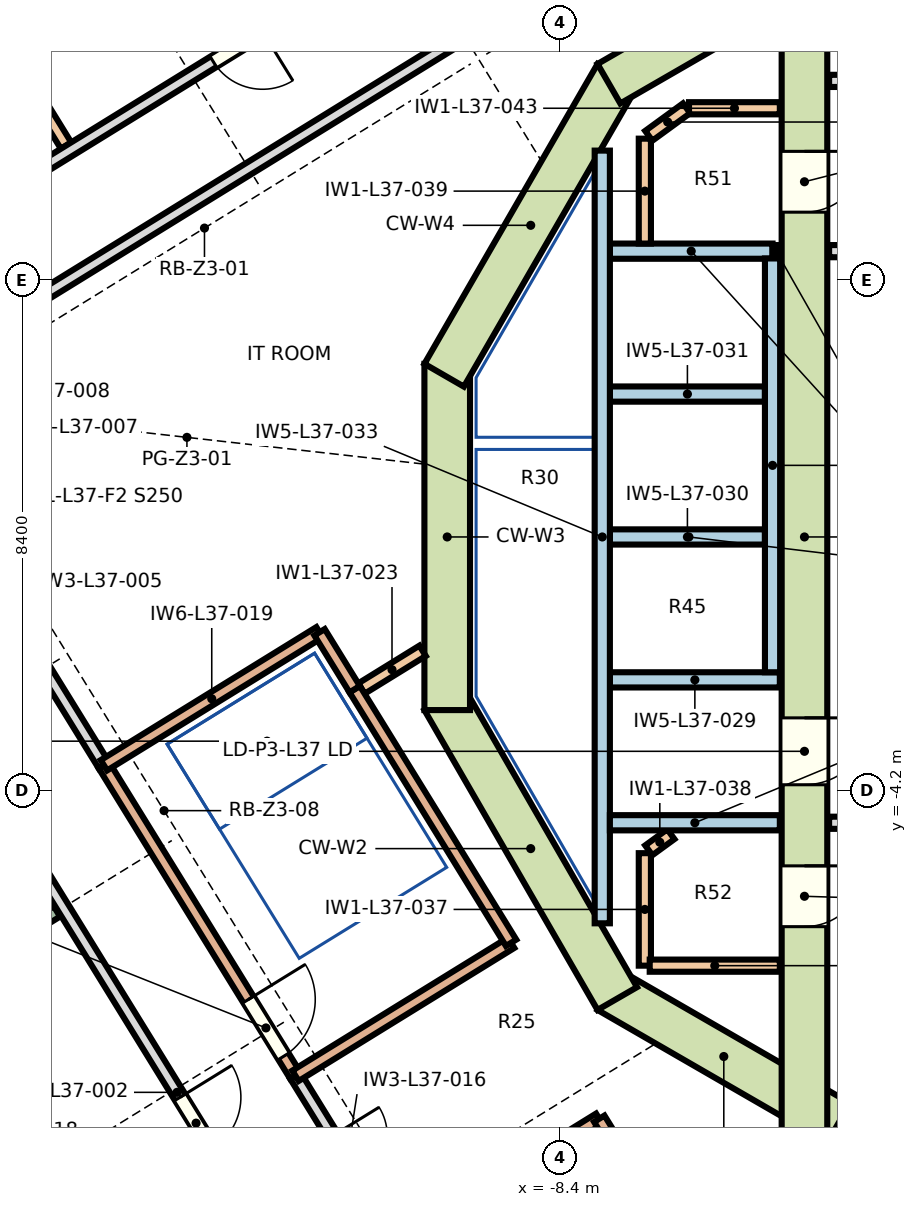
"""IFC4 building model, lengths in metres.
Left out: names, types, materials, properties, quantities, classifications, styles, units other than length and angle.
Written with IfcOpenShell. Run it as: python <this file> out.ifc"""

import sys

from ifc_helpers import new_model, si_unit, direction, frame, frame_2d, origin, place, context, subcontext, project, spatial, rectangle, extrude, element, fill, save


model = new_model("IFC4")
c1 = context("Model", 3, precision=1e-05, world=origin(), true_north=direction((0.0, 1.0)))
c2 = subcontext(c1, "Body", "Model", "MODEL_VIEW")
j1 = project(units=[si_unit("LENGTHUNIT", "METRE"), si_unit("PLANEANGLEUNIT", "RADIAN")], contexts=[c1])
p1 = place(None, origin())
s1 = spatial("IfcSite", under=j1, at=p1, CompositionType="ELEMENT")
p2 = place(p1, origin())
s2 = spatial("IfcBuilding", under=s1, at=p2, CompositionType="ELEMENT")
p3 = place(p2, frame((0.0, 0.0, 170.4)))
s3 = spatial("IfcBuildingStorey", under=s2, at=p3, CompositionType="ELEMENT", Elevation=170.4)
p4 = place(p3, frame((-3.812, -9.635, 0.0), z_axis=(0.0, 0.0, 1.0), x_axis=(-0.866013176292, 0.50002117804, 0.0)))
e1 = element("IfcWall", 1, at=p4, inside=s3, PredefinedType="SHEAR", context=c2, shape_type="SweptSolid", body=[
    extrude(rectangle(XDim=4.363, YDim=0.75, at=frame_2d((2.181, 0.0))), origin(), (0.0, 0.0, 1.0), 3.8),
])
p5 = place(p3, frame((-7.453, -7.591, 0.0), z_axis=(0.0, 0.0, 1.0), x_axis=(-0.500021842983, 0.866012792365, 0.0)))
e2 = element("IfcWall", 2, at=p5, inside=s3, PredefinedType="SHEAR", context=c2, shape_type="SweptSolid", body=[
    extrude(rectangle(XDim=5.694, YDim=0.75, at=frame_2d((2.847, 0.0))), origin(), (0.0, 0.0, 1.0), 3.8),
])
p6 = place(p3, frame((-10.25, -2.847, 0.0), z_axis=(0.0, 0.0, 1.0), x_axis=(0.0, 1.0, 0.0)))
e3 = element("IfcWall", 3, at=p6, inside=s3, PredefinedType="SHEAR", context=c2, shape_type="SweptSolid", body=[
    extrude(rectangle(XDim=5.694, YDim=0.75, at=frame_2d((2.847, 0.0))), origin(), (0.0, 0.0, 1.0), 3.8),
])
p7 = place(p3, frame((-10.301, 2.659, 0.0), z_axis=(0.0, 0.0, 1.0), x_axis=(0.500021842983, 0.866012792365, 0.0)))
e4 = element("IfcWall", 4, at=p7, inside=s3, PredefinedType="SHEAR", context=c2, shape_type="SweptSolid", body=[
    extrude(rectangle(XDim=5.694, YDim=0.75, at=frame_2d((2.847, 0.0))), origin(), (0.0, 0.0, 1.0), 3.8),
])
p8 = place(p3, frame((-7.591, 7.453, 0.0), z_axis=(0.0, 0.0, 1.0), x_axis=(0.866013176292, 0.50002117804, 0.0)))
e5 = element("IfcWall", 5, at=p8, inside=s3, PredefinedType="SHEAR", context=c2, shape_type="SweptSolid", body=[
    extrude(rectangle(XDim=4.363, YDim=0.75, at=frame_2d((2.181, 0.0))), origin(), (0.0, 0.0, 1.0), 3.8),
])
p9 = place(p3, frame((-4.375, 9.959, 0.0), z_axis=(0.0, 0.0, 1.0), x_axis=(0.0, -1.0, 0.0)))
e6 = element("IfcWall", 6, at=p9, inside=s3, PredefinedType="SHEAR", context=c2, shape_type="SweptSolid", body=[
    extrude(rectangle(XDim=19.919, YDim=0.75, at=frame_2d((9.959, 0.0))), origin(), (0.0, 0.0, 1.0), 3.8),
])
p10 = place(p9, frame((12.935, 0.0, 0.0)))
e7 = element("IfcOpeningElement", 7, at=p10, cuts=e6, PredefinedType="OPENING", context=c2, shape_type="SweptSolid", body=[
    extrude(rectangle(XDim=1.1, YDim=2.1, at=frame_2d((0.55, 1.05))), frame((0.0, 0.385, 0.0), z_axis=(0.0, -1.0, 0.0), x_axis=(1.0, 0.0, 0.0)), (0.0, 0.0, 1.0), 0.77),
])
p11 = place(p9, frame((15.368, 0.0, 0.0)))
e8 = element("IfcOpeningElement", 8, at=p11, cuts=e6, PredefinedType="OPENING", context=c2, shape_type="SweptSolid", body=[
    extrude(rectangle(XDim=1.0, YDim=2.1, at=frame_2d((0.5, 1.05))), frame((0.0, 0.385, 0.0), z_axis=(0.0, -1.0, 0.0), x_axis=(1.0, 0.0, 0.0)), (0.0, 0.0, 1.0), 0.77),
])
p12 = place(p9, frame((3.618, 0.0, 0.0)))
e9 = element("IfcOpeningElement", 9, at=p12, cuts=e6, PredefinedType="OPENING", context=c2, shape_type="SweptSolid", body=[
    extrude(rectangle(XDim=1.0, YDim=2.1, at=frame_2d((0.5, 1.05))), frame((0.0, 0.385, 0.0), z_axis=(0.0, -1.0, 0.0), x_axis=(1.0, 0.0, 0.0)), (0.0, 0.0, 1.0), 0.77),
])
p13 = place(p3, frame((-22.037, 2.774, 0.0), z_axis=(0.0, 0.0, 1.0), x_axis=(0.524973936666, -0.85111830307, 0.0)))
e10 = element("IfcWall", 10, at=p13, inside=s3, PredefinedType="PARTITIONING", context=c2, shape_type="SweptSolid", body=[
    extrude(rectangle(XDim=27.98, YDim=0.2, at=frame_2d((13.99, 0.0))), origin(), (0.0, 0.0, 1.0), 3.55),
])
p14 = place(p13, frame((4.55, 0.0, 0.0)))
e11 = element("IfcOpeningElement", 11, at=p14, cuts=e10, PredefinedType="OPENING", context=c2, shape_type="SweptSolid", body=[
    extrude(rectangle(XDim=1.2, YDim=2.1, at=frame_2d((0.6, 1.05))), frame((0.0, 0.11, 0.0), z_axis=(0.0, -1.0, 0.0), x_axis=(1.0, 0.0, 0.0)), (0.0, 0.0, 1.0), 0.22),
])
p15 = place(p13, frame((14.085, 0.0, 0.0)))
e12 = element("IfcOpeningElement", 12, at=p15, cuts=e10, PredefinedType="OPENING", context=c2, shape_type="SweptSolid", body=[
    extrude(rectangle(XDim=1.0, YDim=2.1, at=frame_2d((0.5, 1.05))), frame((0.0, 0.11, 0.0), z_axis=(0.0, -1.0, 0.0), x_axis=(1.0, 0.0, 0.0)), (0.0, 0.0, 1.0), 0.22),
])
p16 = place(p13, frame((24.89, 0.0, 0.0)))
e13 = element("IfcOpeningElement", 13, at=p16, cuts=e10, PredefinedType="OPENING", context=c2, shape_type="SweptSolid", body=[
    extrude(rectangle(XDim=0.95, YDim=2.1, at=frame_2d((0.475, 1.05))), frame((0.0, 0.11, 0.0), z_axis=(0.0, -1.0, 0.0), x_axis=(1.0, 0.0, 0.0)), (0.0, 0.0, 1.0), 0.22),
])
p17 = place(p3, frame((-19.623, 2.289, 0.0), z_axis=(0.0, 0.0, 1.0), x_axis=(0.524973806956, -0.851118383076, 0.0)))
e14 = element("IfcWall", 14, at=p17, inside=s3, PredefinedType="PARTITIONING", context=c2, shape_type="SweptSolid", body=[
    extrude(rectangle(XDim=7.101, YDim=0.2, at=frame_2d((3.55, 0.0))), origin(), (0.0, 0.0, 1.0), 3.55),
])
p18 = place(p3, frame((-17.873, 8.632, 0.0), z_axis=(0.0, 0.0, 1.0), x_axis=(0.525005247362, -0.851098989685, 0.0)))
e15 = element("IfcWall", 15, at=p18, inside=s3, PredefinedType="PARTITIONING", context=c2, shape_type="SweptSolid", body=[
    extrude(rectangle(XDim=2.58, YDim=0.2, at=frame_2d((1.29, 0.0))), origin(), (0.0, 0.0, 1.0), 3.55),
])
p19 = place(p18, frame((0.544, 0.0, 0.0)))
e16 = element("IfcOpeningElement", 16, at=p19, cuts=e15, PredefinedType="OPENING", context=c2, shape_type="SweptSolid", body=[
    extrude(rectangle(XDim=0.8, YDim=2.1, at=frame_2d((0.4, 1.05))), frame((0.0, 0.11, 0.0), z_axis=(0.0, -1.0, 0.0), x_axis=(1.0, 0.0, 0.0)), (0.0, 0.0, 1.0), 0.22),
])
p20 = place(p3, frame((-16.669, -6.158, 0.0), z_axis=(0.0, 0.0, 1.0), x_axis=(-0.851109277096, -0.52498856982, 0.0)))
e17 = element("IfcWall", 17, at=p20, inside=s3, PredefinedType="PARTITIONING", context=c2, shape_type="SweptSolid", body=[
    extrude(rectangle(XDim=7.35, YDim=0.2, at=frame_2d((3.675, 0.0))), origin(), (0.0, 0.0, 1.0), 2.65),
])
p21 = place(p3, frame((-15.896, -3.755, 0.0), z_axis=(0.0, 0.0, 1.0), x_axis=(0.524982543144, -0.851112994493, 0.0)))
e18 = element("IfcWall", 18, at=p21, inside=s3, PredefinedType="SOLIDWALL", context=c2, shape_type="SweptSolid", body=[
    extrude(rectangle(XDim=6.0, YDim=0.2, at=frame_2d((3.0, 0.0))), origin(), (0.0, 0.0, 1.0), 3.55),
])
p22 = place(p21, frame((4.525, 0.0, 0.0)))
e19 = element("IfcOpeningElement", 19, at=p22, cuts=e18, PredefinedType="OPENING", context=c2, shape_type="SweptSolid", body=[
    extrude(rectangle(XDim=1.1, YDim=2.1, at=frame_2d((0.55, 1.05))), frame((0.0, 0.11, 0.0), z_axis=(0.0, -1.0, 0.0), x_axis=(1.0, 0.0, 0.0)), (0.0, 0.0, 1.0), 0.22),
])
p23 = place(p3, frame((-12.746, -8.861, 0.0), z_axis=(0.0, 0.0, 1.0), x_axis=(0.524959112102, -0.851127446756, 0.0)))
e20 = element("IfcWall", 20, at=p23, inside=s3, PredefinedType="PARTITIONING", context=c2, shape_type="SweptSolid", body=[
    extrude(rectangle(XDim=3.224, YDim=0.2, at=frame_2d((1.612, 0.0))), origin(), (0.0, 0.0, 1.0), 3.55),
])
p24 = place(p23, frame((1.162, 0.0, 0.0)))
e21 = element("IfcOpeningElement", 21, at=p24, cuts=e20, PredefinedType="OPENING", context=c2, shape_type="SweptSolid", body=[
    extrude(rectangle(XDim=0.9, YDim=2.1, at=frame_2d((0.45, 1.05))), frame((0.0, 0.11, 0.0), z_axis=(0.0, -1.0, 0.0), x_axis=(1.0, 0.0, 0.0)), (0.0, 0.0, 1.0), 0.22),
])
for number, where, z_axis, x_axis in (
    (22, (-12.746, -8.861, 0.0), (0.0, 0.0, 1.0), (0.851, 0.525, 0.0)),
    (23, (-12.349, -1.567, 0.0), (0.0, 0.0, 1.0), (-0.851, -0.525, 0.0)),
):
    element("IfcWall", number, at=place(p3, frame(where, z_axis=z_axis, x_axis=x_axis)), inside=s3, PredefinedType="SOLIDWALL", context=c2, shape_type="SweptSolid", body=[
        extrude(rectangle(XDim=4.167, YDim=0.2, at=frame_2d((2.083, 0.0))), origin(), (0.0, 0.0, 1.0), 3.55),
    ])
p25 = place(p3, frame((-10.655, -1.873, 0.0), z_axis=(0.0, 0.0, 1.0), x_axis=(-0.851083160227, -0.525030908021, 0.0)))
e24 = element("IfcWall", 24, at=p25, inside=s3, PredefinedType="PARTITIONING", context=c2, shape_type="SweptSolid", body=[
    extrude(rectangle(XDim=1.182, YDim=0.2, at=frame_2d((0.591, 0.0))), origin(), (0.0, 0.0, 1.0), 3.55),
])
p26 = place(p3, frame((-9.199, -6.674, 0.0), z_axis=(0.0, 0.0, 1.0), x_axis=(-0.524942245614, 0.851137849452, 0.0)))
e25 = element("IfcWall", 25, at=p26, inside=s3, PredefinedType="SOLIDWALL", context=c2, shape_type="SweptSolid", body=[
    extrude(rectangle(XDim=4.9, YDim=0.2, at=frame_2d((2.45, 0.0))), origin(), (0.0, 0.0, 1.0), 3.55),
])
p27 = place(p3, frame((-7.749, -9.567, 0.0), z_axis=(0.0, 0.0, 1.0), x_axis=(-0.851124503894, -0.524963883397, 0.0)))
e26 = element("IfcWall", 26, at=p27, inside=s3, PredefinedType="SOLIDWALL", context=c2, shape_type="SweptSolid", body=[
    extrude(rectangle(XDim=3.882, YDim=0.2, at=frame_2d((1.941, 0.0))), origin(), (0.0, 0.0, 1.0), 3.55),
])
p28 = place(p3, frame((-7.575, -2.35, 0.0), z_axis=(0.0, 0.0, 1.0), x_axis=(1.0, 0.0, 0.0)))
e27 = element("IfcWall", 27, at=p28, inside=s3, PredefinedType="SOLIDWALL", context=c2, shape_type="SweptSolid", body=[
    extrude(rectangle(XDim=2.795, YDim=0.25, at=frame_2d((1.397, 0.0))), origin(), (0.0, 0.0, 1.0), 3.55),
])
for number, where, z_axis, x_axis in (
    (28, (-7.575, 0.0, 0.0), (0.0, 0.0, 1.0), (1.0, 0.0, 0.0)),
    (29, (-7.575, 2.35, 0.0), (0.0, 0.0, 1.0), (1.0, 0.0, 0.0)),
):
    element("IfcWall", number, at=place(p3, frame(where, z_axis=z_axis, x_axis=x_axis)), inside=s3, PredefinedType="SOLIDWALL", context=c2, shape_type="SweptSolid", body=[
        extrude(rectangle(XDim=2.55, YDim=0.25, at=frame_2d((1.275, 0.0))), origin(), (0.0, 0.0, 1.0), 3.55),
    ])
p29 = place(p3, frame((-7.575, 4.7, 0.0), z_axis=(0.0, 0.0, 1.0), x_axis=(1.0, 0.0, 0.0)))
e30 = element("IfcWall", 30, at=p29, inside=s3, PredefinedType="SOLIDWALL", context=c2, shape_type="SweptSolid", body=[
    extrude(rectangle(XDim=2.675, YDim=0.25, at=frame_2d((1.337, 0.0))), origin(), (0.0, 0.0, 1.0), 3.55),
])
p30 = place(p3, frame((-7.7, 6.354, 0.0), z_axis=(0.0, 0.0, 1.0), x_axis=(0.0, -1.0, 0.0)))
e31 = element("IfcWall", 31, at=p30, inside=s3, PredefinedType="SOLIDWALL", context=c2, shape_type="SweptSolid", body=[
    extrude(rectangle(XDim=12.707, YDim=0.25, at=frame_2d((6.354, 0.0))), origin(), (0.0, 0.0, 1.0), 3.55),
])
p31 = place(p3, frame((-7.0, -7.05, 0.0), z_axis=(0.0, 0.0, 1.0), x_axis=(0.0, 1.0, 0.0)))
e32 = element("IfcWall", 32, at=p31, inside=s3, PredefinedType="PARTITIONING", context=c2, shape_type="SweptSolid", body=[
    extrude(rectangle(XDim=1.85, YDim=0.2, at=frame_2d((0.925, 0.0))), origin(), (0.0, 0.0, 1.0), 3.55),
])
p32 = place(p3, frame((-6.935, -5.153, 0.0), z_axis=(0.0, 0.0, 1.0), x_axis=(0.808147744029, 0.58897981614, 0.0)))
e33 = element("IfcWall", 33, at=p32, inside=s3, PredefinedType="PARTITIONING", context=c2, shape_type="SweptSolid", body=[
    extrude(rectangle(XDim=0.449, YDim=0.2, at=frame_2d((0.225, 0.0))), origin(), (0.0, 0.0, 1.0), 3.55),
])
p33 = place(p3, frame((-7.0, 4.825, 0.0), z_axis=(0.0, 0.0, 1.0), x_axis=(0.0, 1.0, 0.0)))
e34 = element("IfcWall", 34, at=p33, inside=s3, PredefinedType="PARTITIONING", context=c2, shape_type="SweptSolid", body=[
    extrude(rectangle(XDim=1.725, YDim=0.2, at=frame_2d((0.863, 0.0))), origin(), (0.0, 0.0, 1.0), 3.55),
])
p34 = place(p3, frame((-6.935, 6.597, 0.0), z_axis=(0.0, 0.0, 1.0), x_axis=(0.808227862651, 0.588869868506, 0.0)))
e35 = element("IfcWall", 35, at=p34, inside=s3, PredefinedType="PARTITIONING", context=c2, shape_type="SweptSolid", body=[
    extrude(rectangle(XDim=0.769, YDim=0.2, at=frame_2d((0.385, 0.0))), origin(), (0.0, 0.0, 1.0), 3.55),
])
p35 = place(p3, frame((-6.274, 7.05, 0.0), z_axis=(0.0, 0.0, 1.0), x_axis=(1.0, 0.0, 0.0)))
e36 = element("IfcWall", 36, at=p35, inside=s3, PredefinedType="PARTITIONING", context=c2, shape_type="SweptSolid", body=[
    extrude(rectangle(XDim=1.494, YDim=0.2, at=frame_2d((0.747, 0.0))), origin(), (0.0, 0.0, 1.0), 3.55),
])
p36 = place(p3, frame((-4.9, 4.58, 0.0), z_axis=(0.0, 0.0, 1.0), x_axis=(0.0, -1.0, 0.0)))
e37 = element("IfcWall", 37, at=p36, inside=s3, PredefinedType="SOLIDWALL", context=c2, shape_type="SweptSolid", body=[
    extrude(rectangle(XDim=6.805, YDim=0.25, at=frame_2d((3.403, 0.0))), origin(), (0.0, 0.0, 1.0), 3.55),
])
p37 = place(p3, frame((-4.78, -7.05, 0.0), z_axis=(0.0, 0.0, 1.0), x_axis=(-1.0, 0.0, 0.0)))
e38 = element("IfcWall", 38, at=p37, inside=s3, PredefinedType="PARTITIONING", context=c2, shape_type="SweptSolid", body=[
    extrude(rectangle(XDim=2.14, YDim=0.2, at=frame_2d((1.07, 0.0))), origin(), (0.0, 0.0, 1.0), 3.55),
])
p38 = place(p3, frame((-4.78, -4.7, 0.0), z_axis=(0.0, 0.0, 1.0), x_axis=(-1.0, 0.0, 0.0)))
e39 = element("IfcWall", 39, at=p38, inside=s3, PredefinedType="SOLIDWALL", context=c2, shape_type="SweptSolid", body=[
    extrude(rectangle(XDim=2.795, YDim=0.25, at=frame_2d((1.397, 0.0))), origin(), (0.0, 0.0, 1.0), 3.55),
])
p39 = place(p3, frame((-4.78, 4.7, 0.0), z_axis=(0.0, 0.0, 1.0), x_axis=(-1.0, 0.0, 0.0)))
e40 = element("IfcWall", 40, at=p39, inside=s3, PredefinedType="PARTITIONING", context=c2, shape_type="SweptSolid", body=[
    extrude(rectangle(XDim=0.12, YDim=0.2, at=frame_2d((0.06, 0.0))), origin(), (0.0, 0.0, 1.0), 3.55),
])
p40 = place(p3, frame((-3.97, 4.7, 0.0), z_axis=(0.0, 0.0, 1.0), x_axis=(1.0, 0.0, 0.0)))
e41 = element("IfcWall", 41, at=p40, inside=s3, PredefinedType="PARTITIONING", context=c2, shape_type="SweptSolid", body=[
    extrude(rectangle(XDim=7.94, YDim=0.2, at=frame_2d((3.97, 0.0))), origin(), (0.0, 0.0, 1.0), 3.55),
])
p41 = place(p40, frame((2.97, 0.0, 0.0)))
e42 = element("IfcOpeningElement", 42, at=p41, cuts=e41, PredefinedType="OPENING", context=c2, shape_type="SweptSolid", body=[
    extrude(rectangle(XDim=2.0, YDim=2.1, at=frame_2d((1.0, 1.05))), frame((0.0, 0.11, 0.0), z_axis=(0.0, -1.0, 0.0), x_axis=(1.0, 0.0, 0.0)), (0.0, 0.0, 1.0), 0.22),
])
p42 = place(p3, frame((-3.97, 7.5, 0.0), z_axis=(0.0, 0.0, 1.0), x_axis=(1.0, 0.0, 0.0)))
e43 = element("IfcWall", 43, at=p42, inside=s3, PredefinedType="PARTITIONING", context=c2, shape_type="SweptSolid", body=[
    extrude(rectangle(XDim=3.97, YDim=0.2, at=frame_2d((1.985, 0.0))), origin(), (0.0, 0.0, 1.0), 3.55),
])
p43 = place(p3, frame((0.8, -4.7, 0.0), z_axis=(0.0, 0.0, 1.0), x_axis=(-1.0, 0.0, 0.0)))
e44 = element("IfcWall", 44, at=p43, inside=s3, PredefinedType="PARTITIONING", context=c2, shape_type="SweptSolid", body=[
    extrude(rectangle(XDim=4.77, YDim=0.2, at=frame_2d((2.385, 0.0))), origin(), (0.0, 0.0, 1.0), 3.55),
])
p44 = place(p43, frame((1.4, 0.0, 0.0)))
e45 = element("IfcOpeningElement", 45, at=p44, cuts=e44, PredefinedType="OPENING", context=c2, shape_type="SweptSolid", body=[
    extrude(rectangle(XDim=2.0, YDim=2.1, at=frame_2d((1.0, 1.05))), frame((0.0, 0.11, 0.0), z_axis=(0.0, -1.0, 0.0), x_axis=(1.0, 0.0, 0.0)), (0.0, 0.0, 1.0), 0.22),
])
p45 = place(p3, frame((6.761, 18.563, 0.0), z_axis=(0.0, 0.0, 1.0), x_axis=(-0.851115762051, -0.524978056292, 0.0)))
e46 = element("IfcWall", 46, at=p45, inside=s3, PredefinedType="PARTITIONING", context=c2, shape_type="SweptSolid", body=[
    extrude(rectangle(XDim=30.88, YDim=0.2, at=frame_2d((15.44, 0.0))), origin(), (0.0, 0.0, 1.0), 3.55),
])
p46 = place(p45, frame((13.067, 0.0, 0.0)))
e47 = element("IfcOpeningElement", 47, at=p46, cuts=e46, PredefinedType="OPENING", context=c2, shape_type="SweptSolid", body=[
    extrude(rectangle(XDim=0.9, YDim=2.1, at=frame_2d((0.45, 1.05))), frame((0.0, 0.11, 0.0), z_axis=(0.0, -1.0, 0.0), x_axis=(1.0, 0.0, 0.0)), (0.0, 0.0, 1.0), 0.22),
])
p47 = place(p45, frame((4.594, 0.0, 0.0)))
e48 = element("IfcOpeningElement", 48, at=p47, cuts=e46, PredefinedType="OPENING", context=c2, shape_type="SweptSolid", body=[
    extrude(rectangle(XDim=2.0, YDim=2.1, at=frame_2d((1.0, 1.05))), frame((0.0, 0.11, 0.0), z_axis=(0.0, -1.0, 0.0), x_axis=(1.0, 0.0, 0.0)), (0.0, 0.0, 1.0), 0.22),
])
p48 = place(p3, frame((7.348, 21.04, 0.0), z_axis=(0.0, 0.0, 1.0), x_axis=(-0.85111711572, -0.524975861662, 0.0)))
e49 = element("IfcWall", 49, at=p48, inside=s3, PredefinedType="PARTITIONING", context=c2, shape_type="SweptSolid", body=[
    extrude(rectangle(XDim=34.6, YDim=0.2, at=frame_2d((17.3, 0.0))), origin(), (0.0, 0.0, 1.0), 3.55),
])
p49 = place(p48, frame((7.12, 0.0, 0.0)))
e50 = element("IfcOpeningElement", 50, at=p49, cuts=e49, PredefinedType="OPENING", context=c2, shape_type="SweptSolid", body=[
    extrude(rectangle(XDim=1.0, YDim=2.1, at=frame_2d((0.5, 1.05))), frame((0.0, 0.11, 0.0), z_axis=(0.0, -1.0, 0.0), x_axis=(1.0, 0.0, 0.0)), (0.0, 0.0, 1.0), 0.22),
])
p50 = place(p48, frame((24.245, 0.0, 0.0)))
e51 = element("IfcOpeningElement", 51, at=p50, cuts=e49, PredefinedType="OPENING", context=c2, shape_type="SweptSolid", body=[
    extrude(rectangle(XDim=0.95, YDim=2.1, at=frame_2d((0.475, 1.05))), frame((0.0, 0.11, 0.0), z_axis=(0.0, -1.0, 0.0), x_axis=(1.0, 0.0, 0.0)), (0.0, 0.0, 1.0), 0.22),
])
p51 = place(p48, frame((0.65, 0.0, 0.0)))
e52 = element("IfcOpeningElement", 52, at=p51, cuts=e49, PredefinedType="OPENING", context=c2, shape_type="SweptSolid", body=[
    extrude(rectangle(XDim=1.0, YDim=2.1, at=frame_2d((0.5, 1.05))), frame((0.0, 0.11, 0.0), z_axis=(0.0, -1.0, 0.0), x_axis=(1.0, 0.0, 0.0)), (0.0, 0.0, 1.0), 0.22),
])
p52 = place(p48, frame((31.64, 0.0, 0.0)))
e53 = element("IfcOpeningElement", 53, at=p52, cuts=e49, PredefinedType="OPENING", context=c2, shape_type="SweptSolid", body=[
    extrude(rectangle(XDim=1.1, YDim=2.1, at=frame_2d((0.55, 1.05))), frame((0.0, 0.11, 0.0), z_axis=(0.0, -1.0, 0.0), x_axis=(1.0, 0.0, 0.0)), (0.0, 0.0, 1.0), 0.22),
])
for number, where, z_axis, x_axis in (
    (54, (-11.772, -2.503, 0.0), (0.0, 0.0, 1.0), (-0.525, 0.851, 0.0)),
    (55, (-7.172, -10.503, 0.0), (0.0, 0.0, 1.0), (-0.525, 0.851, 0.0)),
):
    element("IfcWall", number, at=place(p3, frame(where, z_axis=z_axis, x_axis=x_axis)), inside=s3, PredefinedType="SOLIDWALL", context=c2, shape_type="SweptSolid", body=[
        extrude(rectangle(XDim=1.1, YDim=0.2, at=frame_2d((0.55, 0.0))), origin(), (0.0, 0.0, 1.0), 3.55),
    ])
p53 = place(p22, origin())
e56 = element("IfcDoor", 56, at=p53, inside=s3, OperationType="NOTDEFINED", PredefinedType="DOOR", context=c2, shape_type="SweptSolid", body=[
    extrude(rectangle(XDim=1.1, YDim=2.1, at=frame_2d((0.55, 1.05))), frame((0.0, 0.025, 0.0), z_axis=(0.0, -1.0, 0.0), x_axis=(1.0, 0.0, 0.0)), (0.0, 0.0, 1.0), 0.05),
])
fill(e19, e56)
p54 = place(p50, origin())
e57 = element("IfcDoor", 57, at=p54, inside=s3, OperationType="NOTDEFINED", PredefinedType="DOOR", context=c2, shape_type="SweptSolid", body=[
    extrude(rectangle(XDim=0.95, YDim=2.1, at=frame_2d((0.475, 1.05))), frame((0.0, 0.025, 0.0), z_axis=(0.0, -1.0, 0.0), x_axis=(1.0, 0.0, 0.0)), (0.0, 0.0, 1.0), 0.05),
])
fill(e51, e57)
p55 = place(p15, origin())
e58 = element("IfcDoor", 58, at=p55, inside=s3, OperationType="NOTDEFINED", PredefinedType="DOOR", context=c2, shape_type="SweptSolid", body=[
    extrude(rectangle(XDim=1.0, YDim=2.1, at=frame_2d((0.5, 1.05))), frame((0.0, 0.025, 0.0), z_axis=(0.0, -1.0, 0.0), x_axis=(1.0, 0.0, 0.0)), (0.0, 0.0, 1.0), 0.05),
])
fill(e12, e58)
p56 = place(p10, origin())
e59 = element("IfcDoor", 59, at=p56, inside=s3, OperationType="SLIDING_TO_LEFT", PredefinedType="DOOR", context=c2, shape_type="SweptSolid", body=[
    extrude(rectangle(XDim=1.1, YDim=2.1, at=frame_2d((0.55, 1.05))), frame((0.0, 0.025, 0.0), z_axis=(0.0, -1.0, 0.0), x_axis=(1.0, 0.0, 0.0)), (0.0, 0.0, 1.0), 0.05),
])
fill(e7, e59)
p57 = place(p11, origin())
e60 = element("IfcDoor", 60, at=p57, inside=s3, OperationType="NOTDEFINED", PredefinedType="DOOR", context=c2, shape_type="SweptSolid", body=[
    extrude(rectangle(XDim=1.0, YDim=2.1, at=frame_2d((0.5, 1.05))), frame((0.0, 0.025, 0.0), z_axis=(0.0, -1.0, 0.0), x_axis=(1.0, 0.0, 0.0)), (0.0, 0.0, 1.0), 0.05),
])
fill(e8, e60)
p58 = place(p12, origin())
e61 = element("IfcDoor", 61, at=p58, inside=s3, OperationType="NOTDEFINED", PredefinedType="DOOR", context=c2, shape_type="SweptSolid", body=[
    extrude(rectangle(XDim=1.0, YDim=2.1, at=frame_2d((0.5, 1.05))), frame((0.0, 0.025, 0.0), z_axis=(0.0, -1.0, 0.0), x_axis=(1.0, 0.0, 0.0)), (0.0, 0.0, 1.0), 0.05),
])
fill(e9, e61)
save(model, sys.argv[1])
